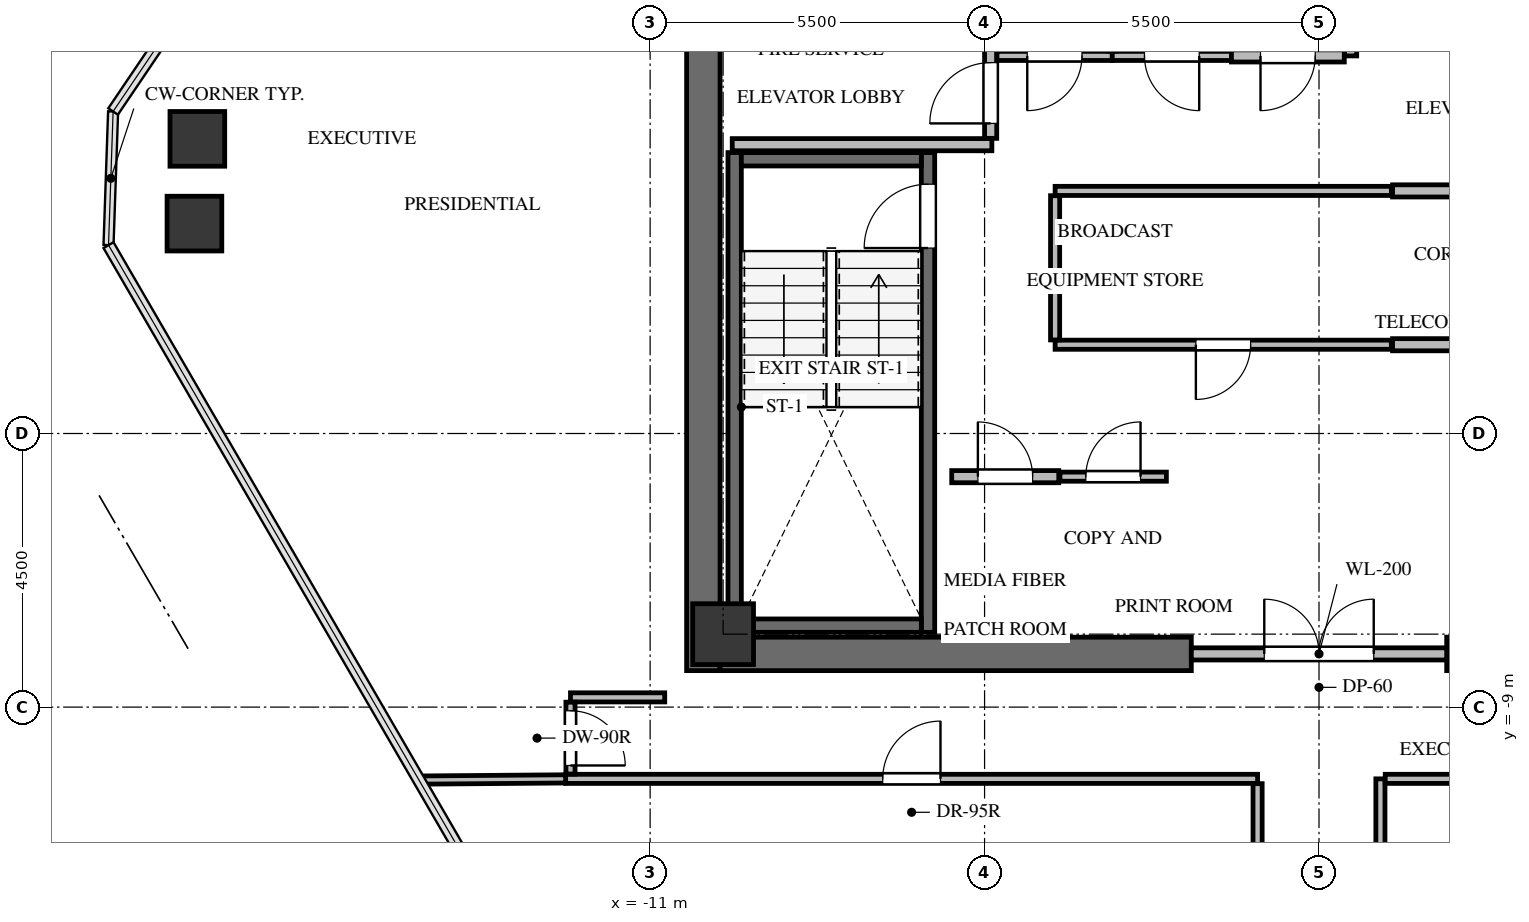
"""IFC4 building model, lengths in metres.
Left out: names, types, materials, properties, quantities, classifications, styles, units other than length and angle.
Written with IfcOpenShell. Run it as: python <this file> out.ifc"""

import sys

from ifc_helpers import new_model, si_unit, direction, frame, frame_2d, origin, origin_2d, place, context, subcontext, project, spatial, rectangle, extrude, source, transform, mapped, element, fill, save


model = new_model("IFC4")
c1 = context("Model", 3, precision=1e-05, world=origin(), true_north=direction((0.0, 1.0)))
c2 = subcontext(c1, "Body", "Model", "MODEL_VIEW")
j1 = project(units=[si_unit("LENGTHUNIT", "METRE"), si_unit("PLANEANGLEUNIT", "RADIAN")], contexts=[c1])
p1 = place(None, origin())
s1 = spatial("IfcSite", under=j1, at=p1, CompositionType="ELEMENT")
p2 = place(p1, origin())
s2 = spatial("IfcBuilding", under=s1, at=p2, CompositionType="ELEMENT")
p3 = place(p2, frame((0.0, 0.0, 218.3)))
s3 = spatial("IfcBuildingStorey", under=s2, at=p3, CompositionType="ELEMENT", Elevation=218.3)
p4 = place(p3, frame((-10.125, -8.4, 0.0), z_axis=(0.0, 0.0, 1.0), x_axis=(0.0, 1.0, 0.0)))
e1 = element("IfcWall", 1, at=p4, inside=s3, PredefinedType="SHEAR", context=c2, shape_type="SweptSolid", body=[
    extrude(rectangle(XDim=16.8, YDim=0.55, at=frame_2d((8.4, 0.0))), origin(), (0.0, 0.0, 1.0), 3.3),
])
for number, where, z_axis, x_axis in (
    (2, (-9.85, -8.125, 0.0), (0.0, 0.0, 1.0), (1.0, 0.0, 0.0)),
    (3, (2.1, -8.125, 0.0), (0.0, 0.0, 1.0), (1.0, 0.0, 0.0)),
):
    element("IfcWall", number, at=place(p3, frame(where, z_axis=z_axis, x_axis=x_axis)), inside=s3, PredefinedType="SHEAR", context=c2, shape_type="SweptSolid", body=[
        extrude(rectangle(XDim=7.75, YDim=0.55, at=frame_2d((3.875, 0.0))), origin(), (0.0, 0.0, 1.0), 3.3),
    ])
p5 = place(p3, frame((-6.43, -7.77, -0.24), z_axis=(0.0, 0.0, 1.0), x_axis=(0.0, 1.0, 0.0)))
e4 = element("IfcWall", 4, at=p5, inside=s3, PredefinedType="SHEAR", context=c2, shape_type="SweptSolid", body=[
    extrude(rectangle(XDim=7.89, YDim=0.22, at=frame_2d((3.945, 0.0))), origin(), (0.0, 0.0, 1.0), 3.3),
])
p6 = place(p5, frame((6.32, 0.0, 0.0)))
e5 = element("IfcOpeningElement", 5, at=p6, cuts=e4, PredefinedType="OPENING", context=c2, shape_type="SweptSolid", body=[
    extrude(rectangle(XDim=1.05, YDim=2.15, at=frame_2d((0.525, 1.075))), frame((0.0, 0.12, 0.0), z_axis=(0.0, -1.0, 0.0), x_axis=(1.0, 0.0, 0.0)), (0.0, 0.0, 1.0), 0.24),
])
p7 = place(p3, frame((-9.61, 0.12, -0.24), z_axis=(0.0, 0.0, 1.0), x_axis=(0.0, -1.0, 0.0)))
e6 = element("IfcWall", 6, at=p7, inside=s3, PredefinedType="SHEAR", context=c2, shape_type="SweptSolid", body=[
    extrude(rectangle(XDim=7.89, YDim=0.22, at=frame_2d((3.945, 0.0))), origin(), (0.0, 0.0, 1.0), 3.3),
])
for number, where, z_axis, x_axis in (
    (7, (-9.5, -7.66, -0.24), (0.0, 0.0, 1.0), (1.0, 0.0, 0.0)),
    (8, (-6.54, 0.01, -0.24), (0.0, 0.0, 1.0), (-1.0, 0.0, 0.0)),
):
    element("IfcWall", number, at=place(p3, frame(where, z_axis=z_axis, x_axis=x_axis)), inside=s3, PredefinedType="SHEAR", context=c2, shape_type="SweptSolid", body=[
        extrude(rectangle(XDim=2.96, YDim=0.22, at=frame_2d((1.48, 0.0))), origin(), (0.0, 0.0, 1.0), 3.3),
    ])
m1 = source(origin(), c2, "Body", "SweptSolid", [
    extrude(rectangle(XDim=1.0, YDim=1.0, at=origin_2d()), origin(), (0.0, 0.0, 1.0), 3.3),
])
p8 = place(p3, frame((-9.8, -7.8, -0.24), z_axis=(0.0, 0.0, 1.0), x_axis=(1.0, 0.0, 0.0)))
e9 = element("IfcColumn", 9, at=p8, inside=s3, PredefinedType="COLUMN", context=c2, shape_type="MappedRepresentation", body=[
    mapped(m1, transform((0.0, 0.0, 0.0), x_axis=(1.0, 0.0, 0.0), y_axis=(0.0, 1.0, 0.0), z_axis=(0.0, 0.0, 1.0), scale=1.0)),
])
m2 = source(origin(), c2, "Body", "SweptSolid", [
    extrude(rectangle(XDim=0.9, YDim=0.9, at=origin_2d()), origin(), (0.0, 0.0, 1.0), 3.3),
])
for number, where, z_axis, x_axis in (
    (10, (-18.494, -1.048, -0.24), (0.0, 0.0, 1.0), (1.0, 0.0, 0.0)),
    (11, (-18.446, 0.346, -0.24), (0.0, 0.0, 1.0), (1.0, 0.0, 0.0)),
):
    element("IfcColumn", number, at=place(p3, frame(where, z_axis=z_axis, x_axis=x_axis)), inside=s3, PredefinedType="COLUMN", context=c2, shape_type="MappedRepresentation", body=[
        mapped(m2, transform((0.0, 0.0, 0.0), x_axis=(1.0, 0.0, 0.0), y_axis=(0.0, 1.0, 0.0), z_axis=(0.0, 0.0, 1.0), scale=1.0)),
    ])
p9 = place(p3, frame((-2.1, -8.125, 0.0), z_axis=(0.0, 0.0, 1.0), x_axis=(1.0, 0.0, 0.0)))
e12 = element("IfcWall", 12, at=p9, inside=s3, PredefinedType="SOLIDWALL", context=c2, shape_type="SweptSolid", body=[
    extrude(rectangle(XDim=4.2, YDim=0.2, at=frame_2d((2.1, 0.0))), origin(), (0.0, 0.0, 1.0), 3.045),
])
p10 = place(p9, frame((1.2, 0.0, 0.0)))
e13 = element("IfcOpeningElement", 13, at=p10, cuts=e12, PredefinedType="OPENING", context=c2, shape_type="SweptSolid", body=[
    extrude(rectangle(XDim=1.8, YDim=2.15, at=frame_2d((0.9, 1.075))), frame((0.0, 0.11, 0.0), z_axis=(0.0, -1.0, 0.0), x_axis=(1.0, 0.0, 0.0)), (0.0, 0.0, 1.0), 0.22),
])
p11 = place(p3, frame((-9.65, 0.25, 0.0), z_axis=(0.0, 0.0, 1.0), x_axis=(1.0, 0.0, 0.0)))
e14 = element("IfcWall", 14, at=p11, inside=s3, PredefinedType="SOLIDWALL", context=c2, shape_type="SweptSolid", body=[
    extrude(rectangle(XDim=4.27, YDim=0.2, at=frame_2d((2.135, 0.0))), origin(), (0.0, 0.0, 1.0), 3.045),
])
p12 = place(p3, frame((-5.4, 0.354, 0.0), z_axis=(0.0, 0.0, 1.0), x_axis=(0.0, 1.0, 0.0)))
e15 = element("IfcWall", 15, at=p12, inside=s3, PredefinedType="SOLIDWALL", context=c2, shape_type="SweptSolid", body=[
    extrude(rectangle(XDim=4.026, YDim=0.2, at=frame_2d((2.013, 0.0))), origin(), (0.0, 0.0, 1.0), 3.045),
])
p13 = place(p12, frame((0.246, 0.0, 0.0)))
e16 = element("IfcOpeningElement", 16, at=p13, cuts=e15, PredefinedType="OPENING", context=c2, shape_type="SweptSolid", body=[
    extrude(rectangle(XDim=1.0, YDim=2.15, at=frame_2d((0.5, 1.075))), frame((0.0, 0.11, 0.0), z_axis=(0.0, -1.0, 0.0), x_axis=(1.0, 0.0, 0.0)), (0.0, 0.0, 1.0), 0.22),
])
p14 = place(p3, frame((-6.04, -5.21, 0.0), z_axis=(0.0, 0.0, 1.0), x_axis=(1.0, 0.0, 0.0)))
e17 = element("IfcWall", 17, at=p14, inside=s3, PredefinedType="SOLIDWALL", context=c2, shape_type="SweptSolid", body=[
    extrude(rectangle(XDim=1.76, YDim=0.2, at=frame_2d((0.88, 0.0))), origin(), (0.0, 0.0, 1.0), 3.045),
])
p15 = place(p14, frame((0.43, 0.0, 0.0)))
e18 = element("IfcOpeningElement", 18, at=p15, cuts=e17, PredefinedType="OPENING", context=c2, shape_type="SweptSolid", body=[
    extrude(rectangle(XDim=0.9, YDim=2.05, at=frame_2d((0.45, 1.025))), frame((0.0, 0.11, 0.0), z_axis=(0.0, -1.0, 0.0), x_axis=(1.0, 0.0, 0.0)), (0.0, 0.0, 1.0), 0.22),
])
p16 = place(p3, frame((-4.26, -5.21, 0.0), z_axis=(0.0, 0.0, 1.0), x_axis=(1.0, 0.0, 0.0)))
e19 = element("IfcWall", 19, at=p16, inside=s3, PredefinedType="PARTITIONING", context=c2, shape_type="SweptSolid", body=[
    extrude(rectangle(XDim=1.75, YDim=0.15, at=frame_2d((0.875, 0.0))), origin(), (0.0, 0.0, 1.0), 3.045),
])
p17 = place(p16, frame((0.425, 0.0, 0.0)))
e20 = element("IfcOpeningElement", 20, at=p17, cuts=e19, PredefinedType="OPENING", context=c2, shape_type="SweptSolid", body=[
    extrude(rectangle(XDim=0.9, YDim=2.05, at=frame_2d((0.45, 1.025))), frame((0.0, 0.085, 0.0), z_axis=(0.0, -1.0, 0.0), x_axis=(1.0, 0.0, 0.0)), (0.0, 0.0, 1.0), 0.17),
])
p18 = place(p3, frame((1.19, -3.04, 0.0), z_axis=(0.0, 0.0, 1.0), x_axis=(-1.0, 0.0, 0.0)))
e21 = element("IfcWall", 21, at=p18, inside=s3, PredefinedType="PARTITIONING", context=c2, shape_type="SweptSolid", body=[
    extrude(rectangle(XDim=5.53, YDim=0.15, at=frame_2d((2.765, 0.0))), origin(), (0.0, 0.0, 1.0), 3.045),
])
p19 = place(p18, frame((2.315, 0.0, 0.0)))
e22 = element("IfcOpeningElement", 22, at=p19, cuts=e21, PredefinedType="OPENING", context=c2, shape_type="SweptSolid", body=[
    extrude(rectangle(XDim=0.9, YDim=2.05, at=frame_2d((0.45, 1.025))), frame((0.0, 0.085, 0.0), z_axis=(0.0, -1.0, 0.0), x_axis=(1.0, 0.0, 0.0)), (0.0, 0.0, 1.0), 0.17),
])
p20 = place(p3, frame((-4.34, -0.51, 0.0), z_axis=(0.0, 0.0, 1.0), x_axis=(1.0, 0.0, 0.0)))
e23 = element("IfcWall", 23, at=p20, inside=s3, PredefinedType="PARTITIONING", context=c2, shape_type="SweptSolid", body=[
    extrude(rectangle(XDim=5.53, YDim=0.15, at=frame_2d((2.765, 0.0))), origin(), (0.0, 0.0, 1.0), 3.045),
])
p21 = place(p3, frame((-4.34, -2.961, 0.0), z_axis=(0.0, 0.0, 1.0), x_axis=(0.0, 1.0, 0.0)))
e24 = element("IfcWall", 24, at=p21, inside=s3, PredefinedType="PARTITIONING", context=c2, shape_type="SweptSolid", body=[
    extrude(rectangle(XDim=2.372, YDim=0.15, at=frame_2d((1.186, 0.0))), origin(), (0.0, 0.0, 1.0), 3.045),
])
for number, where, z_axis, x_axis in (
    (25, (3.036, -3.04, 0.0), (0.0, 0.0, 1.0), (-1.0, 0.0, 0.0)),
    (26, (1.21, -0.51, 0.0), (0.0, 0.0, 1.0), (1.0, 0.0, 0.0)),
):
    element("IfcWall", number, at=place(p3, frame(where, z_axis=z_axis, x_axis=x_axis)), inside=s3, PredefinedType="SOLIDWALL", context=c2, shape_type="SweptSolid", body=[
        extrude(rectangle(XDim=1.826, YDim=0.2, at=frame_2d((0.913, 0.0))), origin(), (0.0, 0.0, 1.0), 3.045),
    ])
p22 = place(p3, frame((-3.4, 1.71, 0.0), z_axis=(0.0, 0.0, 1.0), x_axis=(-1.0, 0.0, 0.0)))
e27 = element("IfcWall", 27, at=p22, inside=s3, PredefinedType="PARTITIONING", context=c2, shape_type="SweptSolid", body=[
    extrude(rectangle(XDim=1.896, YDim=0.15, at=frame_2d((0.948, 0.0))), origin(), (0.0, 0.0, 1.0), 3.045),
])
p23 = place(p22, frame((0.498, 0.0, 0.0)))
e28 = element("IfcOpeningElement", 28, at=p23, cuts=e27, PredefinedType="OPENING", context=c2, shape_type="SweptSolid", body=[
    extrude(rectangle(XDim=0.9, YDim=2.05, at=frame_2d((0.45, 1.025))), frame((0.0, 0.085, 0.0), z_axis=(0.0, -1.0, 0.0), x_axis=(1.0, 0.0, 0.0)), (0.0, 0.0, 1.0), 0.17),
])
p24 = place(p3, frame((-1.44, 1.71, 0.0), z_axis=(0.0, 0.0, 1.0), x_axis=(-1.0, 0.0, 0.0)))
e29 = element("IfcWall", 29, at=p24, inside=s3, PredefinedType="PARTITIONING", context=c2, shape_type="SweptSolid", body=[
    extrude(rectangle(XDim=1.96, YDim=0.15, at=frame_2d((0.98, 0.0))), origin(), (0.0, 0.0, 1.0), 3.045),
])
p25 = place(p24, frame((0.53, 0.0, 0.0)))
e30 = element("IfcOpeningElement", 30, at=p25, cuts=e29, PredefinedType="OPENING", context=c2, shape_type="SweptSolid", body=[
    extrude(rectangle(XDim=0.9, YDim=2.05, at=frame_2d((0.45, 1.025))), frame((0.0, 0.085, 0.0), z_axis=(0.0, -1.0, 0.0), x_axis=(1.0, 0.0, 0.0)), (0.0, 0.0, 1.0), 0.17),
])
p26 = place(p3, frame((0.52, 3.3, 0.0), z_axis=(0.0, 0.0, 1.0), x_axis=(0.0, -1.0, 0.0)))
e31 = element("IfcWall", 31, at=p26, inside=s3, PredefinedType="SOLIDWALL", context=c2, shape_type="SweptSolid", body=[
    extrude(rectangle(XDim=1.59, YDim=0.2, at=frame_2d((0.795, 0.0))), origin(), (0.0, 0.0, 1.0), 3.045),
])
p27 = place(p3, frame((0.416, 1.71, 0.0), z_axis=(0.0, 0.0, 1.0), x_axis=(-1.0, 0.0, 0.0)))
e32 = element("IfcWall", 32, at=p27, inside=s3, PredefinedType="SOLIDWALL", context=c2, shape_type="SweptSolid", body=[
    extrude(rectangle(XDim=1.856, YDim=0.2, at=frame_2d((0.928, 0.0))), origin(), (0.0, 0.0, 1.0), 3.045),
])
p28 = place(p27, frame((0.478, 0.0, 0.0)))
e33 = element("IfcOpeningElement", 33, at=p28, cuts=e32, PredefinedType="OPENING", context=c2, shape_type="SweptSolid", body=[
    extrude(rectangle(XDim=0.9, YDim=2.05, at=frame_2d((0.45, 1.025))), frame((0.0, 0.11, 0.0), z_axis=(0.0, -1.0, 0.0), x_axis=(1.0, 0.0, 0.0)), (0.0, 0.0, 1.0), 0.22),
])
p29 = place(p3, frame((-12.39, -10.18, 0.0), z_axis=(0.0, 0.0, 1.0), x_axis=(1.0, 0.0, 0.0)))
e34 = element("IfcWall", 34, at=p29, inside=s3, PredefinedType="PARTITIONING", context=c2, shape_type="SweptSolid", body=[
    extrude(rectangle(XDim=11.38, YDim=0.15, at=frame_2d((5.69, 0.0))), origin(), (0.0, 0.0, 1.0), 2.301),
])
p30 = place(p29, frame((5.215, 0.0, 0.0)))
e35 = element("IfcOpeningElement", 35, at=p30, cuts=e34, PredefinedType="OPENING", context=c2, shape_type="SweptSolid", body=[
    extrude(rectangle(XDim=0.95, YDim=2.1, at=frame_2d((0.475, 1.05))), frame((0.0, 0.085, 0.0), z_axis=(0.0, -1.0, 0.0), x_axis=(1.0, 0.0, 0.0)), (0.0, 0.0, 1.0), 0.17),
])
p31 = place(p3, frame((-1.01, -10.259, 0.0), z_axis=(0.0, 0.0, 1.0), x_axis=(0.0, -1.0, 0.0)))
e36 = element("IfcWall", 36, at=p31, inside=s3, PredefinedType="PARTITIONING", context=c2, shape_type="SweptSolid", body=[
    extrude(rectangle(XDim=6.927, YDim=0.15, at=frame_2d((3.463, 0.0))), origin(), (0.0, 0.0, 1.0), 2.399),
])
p32 = place(p3, frame((1.01, -17.186, 0.0), z_axis=(0.0, 0.0, 1.0), x_axis=(0.0, 1.0, 0.0)))
e37 = element("IfcWall", 37, at=p32, inside=s3, PredefinedType="PARTITIONING", context=c2, shape_type="SweptSolid", body=[
    extrude(rectangle(XDim=7.006, YDim=0.15, at=frame_2d((3.503, 0.0))), origin(), (0.0, 0.0, 1.0), 2.399),
])
p33 = place(p32, frame((3.043, 0.0, 0.0)))
e38 = element("IfcOpeningElement", 38, at=p33, cuts=e37, PredefinedType="OPENING", context=c2, shape_type="SweptSolid", body=[
    extrude(rectangle(XDim=0.92, YDim=2.1, at=frame_2d((0.46, 1.05))), frame((0.0, 0.085, 0.0), z_axis=(0.0, -1.0, 0.0), x_axis=(1.0, 0.0, 0.0)), (0.0, 0.0, 1.0), 0.17),
])
p34 = place(p3, frame((1.089, -10.18, 0.0), z_axis=(0.0, 0.0, 1.0), x_axis=(1.0, 0.0, 0.0)))
e39 = element("IfcWall", 39, at=p34, inside=s3, PredefinedType="PARTITIONING", context=c2, shape_type="SweptSolid", body=[
    extrude(rectangle(XDim=2.151, YDim=0.15, at=frame_2d((1.075, 0.0))), origin(), (0.0, 0.0, 1.0), 2.608),
])
p35 = place(p3, frame((-10.76, -8.84, 0.0), z_axis=(0.0, 0.0, 1.0), x_axis=(-1.0, 0.0, 0.0)))
e40 = element("IfcWall", 40, at=p35, inside=s3, PredefinedType="PARTITIONING", context=c2, shape_type="SweptSolid", body=[
    extrude(rectangle(XDim=1.55, YDim=0.15, at=frame_2d((0.775, 0.0))), origin(), (0.0, 0.0, 1.0), 3.045),
])
p36 = place(p3, frame((-12.31, -8.919, 0.0), z_axis=(0.0, 0.0, 1.0), x_axis=(0.0, -1.0, 0.0)))
e41 = element("IfcWall", 41, at=p36, inside=s3, PredefinedType="PARTITIONING", context=c2, shape_type="SweptSolid", body=[
    extrude(rectangle(XDim=1.182, YDim=0.15, at=frame_2d((0.591, 0.0))), origin(), (0.0, 0.0, 1.0), 3.045),
])
p37 = place(p36, frame((0.141, 0.0, 0.0)))
e42 = element("IfcOpeningElement", 42, at=p37, cuts=e41, PredefinedType="OPENING", context=c2, shape_type="SweptSolid", body=[
    extrude(rectangle(XDim=0.9, YDim=2.05, at=frame_2d((0.45, 1.025))), frame((0.0, 0.085, 0.0), z_axis=(0.0, -1.0, 0.0), x_axis=(1.0, 0.0, 0.0)), (0.0, 0.0, 1.0), 0.17),
])
p38 = place(p3, frame((-14.802, -10.2, 0.0), z_axis=(0.0, 0.0, 1.0), x_axis=(0.999968020968, 0.007997314604, 0.0)))
e43 = element("IfcWall", 43, at=p38, inside=s3, PredefinedType="PARTITIONING", context=c2, shape_type="SweptSolid", body=[
    extrude(rectangle(XDim=2.412, YDim=0.135, at=frame_2d((1.206, 0.0))), origin(), (0.0, 0.0, 1.0), 2.399),
])
m3 = source(origin(), c2, "Body", "SweptSolid", [
    extrude(rectangle(XDim=1.05, YDim=2.15, at=frame_2d((0.525, 1.075))), frame((0.0, 0.025, 0.0), z_axis=(0.0, -1.0, 0.0), x_axis=(1.0, 0.0, 0.0)), (0.0, 0.0, 1.0), 0.05),
])
p39 = place(p6, origin())
e44 = element("IfcDoor", 44, at=p39, inside=s3, OperationType="SINGLE_SWING_LEFT", PredefinedType="DOOR", context=c2, shape_type="MappedRepresentation", body=[
    mapped(m3, transform((0.0, 0.0, 0.0), x_axis=(1.0, 0.0, 0.0), y_axis=(0.0, 1.0, 0.0), z_axis=(0.0, 0.0, 1.0), scale=1.0)),
])
fill(e5, e44)
m4 = source(origin(), c2, "Body", "SweptSolid", [
    extrude(rectangle(XDim=1.8, YDim=2.15, at=frame_2d((0.9, 1.075))), frame((0.0, 0.025, 0.0), z_axis=(0.0, -1.0, 0.0), x_axis=(1.0, 0.0, 0.0)), (0.0, 0.0, 1.0), 0.05),
])
p40 = place(p10, origin())
e45 = element("IfcDoor", 45, at=p40, inside=s3, OperationType="DOUBLE_DOOR_SINGLE_SWING", PredefinedType="DOOR", context=c2, shape_type="MappedRepresentation", body=[
    mapped(m4, transform((0.0, 0.0, 0.0), x_axis=(1.0, 0.0, 0.0), y_axis=(0.0, 1.0, 0.0), z_axis=(0.0, 0.0, 1.0), scale=1.0)),
])
fill(e13, e45)
m5 = source(origin(), c2, "Body", "SweptSolid", [
    extrude(rectangle(XDim=1.0, YDim=2.15, at=frame_2d((0.5, 1.075))), frame((0.0, 0.025, 0.0), z_axis=(0.0, -1.0, 0.0), x_axis=(1.0, 0.0, 0.0)), (0.0, 0.0, 1.0), 0.05),
])
p41 = place(p13, origin())
e46 = element("IfcDoor", 46, at=p41, inside=s3, OperationType="SINGLE_SWING_LEFT", PredefinedType="DOOR", context=c2, shape_type="MappedRepresentation", body=[
    mapped(m5, transform((0.0, 0.0, 0.0), x_axis=(1.0, 0.0, 0.0), y_axis=(0.0, 1.0, 0.0), z_axis=(0.0, 0.0, 1.0), scale=1.0)),
])
fill(e16, e46)
m6 = source(origin(), c2, "Body", "SweptSolid", [
    extrude(rectangle(XDim=0.9, YDim=2.05, at=frame_2d((0.45, 1.025))), frame((0.0, 0.025, 0.0), z_axis=(0.0, -1.0, 0.0), x_axis=(1.0, 0.0, 0.0)), (0.0, 0.0, 1.0), 0.05),
])
p42 = place(p15, origin())
e47 = element("IfcDoor", 47, at=p42, inside=s3, OperationType="SINGLE_SWING_LEFT", PredefinedType="DOOR", context=c2, shape_type="MappedRepresentation", body=[
    mapped(m6, transform((0.0, 0.0, 0.0), x_axis=(1.0, 0.0, 0.0), y_axis=(0.0, 1.0, 0.0), z_axis=(0.0, 0.0, 1.0), scale=1.0)),
])
fill(e18, e47)
m7 = source(origin(), c2, "Body", "SweptSolid", [
    extrude(rectangle(XDim=0.9, YDim=2.05, at=frame_2d((0.45, 1.025))), frame((0.0, 0.025, 0.0), z_axis=(0.0, -1.0, 0.0), x_axis=(1.0, 0.0, 0.0)), (0.0, 0.0, 1.0), 0.05),
])
p43 = place(p17, origin())
e48 = element("IfcDoor", 48, at=p43, inside=s3, OperationType="SINGLE_SWING_RIGHT", PredefinedType="DOOR", context=c2, shape_type="MappedRepresentation", body=[
    mapped(m7, transform((0.0, 0.0, 0.0), x_axis=(1.0, 0.0, 0.0), y_axis=(0.0, 1.0, 0.0), z_axis=(0.0, 0.0, 1.0), scale=1.0)),
])
fill(e20, e48)
p44 = place(p19, origin())
e49 = element("IfcDoor", 49, at=p44, inside=s3, OperationType="SINGLE_SWING_RIGHT", PredefinedType="DOOR", context=c2, shape_type="MappedRepresentation", body=[
    mapped(m7, transform((0.0, 0.0, 0.0), x_axis=(1.0, 0.0, 0.0), y_axis=(0.0, 1.0, 0.0), z_axis=(0.0, 0.0, 1.0), scale=1.0)),
])
fill(e22, e49)
p45 = place(p23, origin())
e50 = element("IfcDoor", 50, at=p45, inside=s3, OperationType="SINGLE_SWING_RIGHT", PredefinedType="DOOR", context=c2, shape_type="MappedRepresentation", body=[
    mapped(m7, transform((0.0, 0.0, 0.0), x_axis=(1.0, 0.0, 0.0), y_axis=(0.0, 1.0, 0.0), z_axis=(0.0, 0.0, 1.0), scale=1.0)),
])
fill(e28, e50)
p46 = place(p25, origin())
e51 = element("IfcDoor", 51, at=p46, inside=s3, OperationType="SINGLE_SWING_LEFT", PredefinedType="DOOR", context=c2, shape_type="MappedRepresentation", body=[
    mapped(m6, transform((0.0, 0.0, 0.0), x_axis=(1.0, 0.0, 0.0), y_axis=(0.0, 1.0, 0.0), z_axis=(0.0, 0.0, 1.0), scale=1.0)),
])
fill(e30, e51)
p47 = place(p28, origin())
e52 = element("IfcDoor", 52, at=p47, inside=s3, OperationType="SINGLE_SWING_RIGHT", PredefinedType="DOOR", context=c2, shape_type="MappedRepresentation", body=[
    mapped(m7, transform((0.0, 0.0, 0.0), x_axis=(1.0, 0.0, 0.0), y_axis=(0.0, 1.0, 0.0), z_axis=(0.0, 0.0, 1.0), scale=1.0)),
])
fill(e33, e52)
m8 = source(origin(), c2, "Body", "SweptSolid", [
    extrude(rectangle(XDim=0.95, YDim=2.1, at=frame_2d((0.475, 1.05))), frame((0.0, 0.025, 0.0), z_axis=(0.0, -1.0, 0.0), x_axis=(1.0, 0.0, 0.0)), (0.0, 0.0, 1.0), 0.05),
])
p48 = place(p30, origin())
e53 = element("IfcDoor", 53, at=p48, inside=s3, OperationType="SINGLE_SWING_RIGHT", PredefinedType="DOOR", context=c2, shape_type="MappedRepresentation", body=[
    mapped(m8, transform((0.0, 0.0, 0.0), x_axis=(1.0, 0.0, 0.0), y_axis=(0.0, 1.0, 0.0), z_axis=(0.0, 0.0, 1.0), scale=1.0)),
])
fill(e35, e53)
m9 = source(origin(), c2, "Body", "SweptSolid", [
    extrude(rectangle(XDim=0.9, YDim=2.05, at=frame_2d((0.45, 1.025))), frame((0.0, 0.025, 0.0), z_axis=(0.0, -1.0, 0.0), x_axis=(1.0, 0.0, 0.0)), (0.0, 0.0, 1.0), 0.05),
])
p49 = place(p37, origin())
e54 = element("IfcDoor", 54, at=p49, inside=s3, OperationType="SINGLE_SWING_RIGHT", PredefinedType="DOOR", context=c2, shape_type="MappedRepresentation", body=[
    mapped(m9, transform((0.0, 0.0, 0.0), x_axis=(1.0, 0.0, 0.0), y_axis=(0.0, 1.0, 0.0), z_axis=(0.0, 0.0, 1.0), scale=1.0)),
])
fill(e42, e54)
save(model, sys.argv[1])
